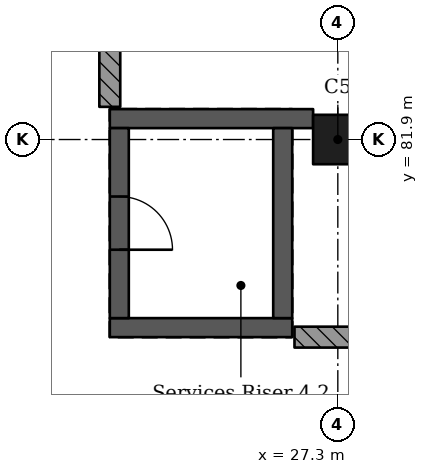
"""IFC4 building model, lengths in metres.
Left out: names, types, materials, properties, quantities, classifications, styles, units other than length and angle.
Written with IfcOpenShell. Run it as: python <this file> out.ifc"""

import sys

from ifc_helpers import new_model, si_unit, direction, frame, frame_2d, origin, origin_2d, place, context, subcontext, project, spatial, rectangle, extrude, element, fill, save


model = new_model("IFC4")
c1 = context("Model", 3, precision=1e-05, world=origin(), true_north=direction((0.0, 1.0)))
c2 = subcontext(c1, "Body", "Model", "MODEL_VIEW")
j1 = project(units=[si_unit("LENGTHUNIT", "METRE"), si_unit("PLANEANGLEUNIT", "RADIAN")], contexts=[c1])
p1 = place(None, origin())
s1 = spatial("IfcSite", under=j1, at=p1, CompositionType="ELEMENT")
p2 = place(p1, origin())
s2 = spatial("IfcBuilding", under=s1, at=p2, CompositionType="ELEMENT")
p3 = place(p2, frame((0.0, 0.0, 15.47)))
s3 = spatial("IfcBuildingStorey", under=s2, at=p3, CompositionType="ELEMENT", Elevation=15.47)
p4 = place(p3, frame((27.3, 81.9, 0.0), z_axis=(0.0, 0.0, 1.0), x_axis=(1.0, 0.0, 0.0)))
e1 = element("IfcColumn", 1, at=p4, inside=s3, PredefinedType="COLUMN", context=c2, shape_type="SweptSolid", body=[
    extrude(rectangle(XDim=0.65, YDim=0.65, at=origin_2d()), origin(), (0.0, 0.0, 1.0), 4.55),
])
p5 = place(p3, frame((26.7, 79.425, 0.0), z_axis=(0.0, 0.0, 1.0), x_axis=(-1.0, 0.0, 0.0)))
e2 = element("IfcWall", 2, at=p5, inside=s3, PredefinedType="SHEAR", context=c2, shape_type="SweptSolid", body=[
    extrude(rectangle(XDim=2.4, YDim=0.25, at=frame_2d((1.2, 0.0))), origin(), (0.0, 0.0, 1.0), 4.55),
])
p6 = place(p3, frame((26.975, 82.175, 0.0), z_axis=(0.0, 0.0, 1.0), x_axis=(-1.0, 0.0, 0.0)))
e3 = element("IfcWall", 3, at=p6, inside=s3, PredefinedType="SHEAR", context=c2, shape_type="SweptSolid", body=[
    extrude(rectangle(XDim=2.675, YDim=0.25, at=frame_2d((1.337, 0.0))), origin(), (0.0, 0.0, 1.0), 4.55),
])
p7 = place(p3, frame((24.425, 82.05, 0.0), z_axis=(0.0, 0.0, 1.0), x_axis=(0.0, -1.0, 0.0)))
e4 = element("IfcWall", 4, at=p7, inside=s3, PredefinedType="SHEAR", context=c2, shape_type="SweptSolid", body=[
    extrude(rectangle(XDim=2.5, YDim=0.25, at=frame_2d((1.25, 0.0))), origin(), (0.0, 0.0, 1.0), 4.55),
])
p8 = place(p7, frame((0.9, 0.0, 0.0)))
e5 = element("IfcOpeningElement", 5, at=p8, cuts=e4, PredefinedType="OPENING", context=c2, shape_type="SweptSolid", body=[
    extrude(rectangle(XDim=0.7, YDim=2.1, at=frame_2d((0.35, 1.05))), frame((0.0, 0.135, 0.0), z_axis=(0.0, -1.0, 0.0), x_axis=(1.0, 0.0, 0.0)), (0.0, 0.0, 1.0), 0.27),
])
p9 = place(p3, frame((26.575, 82.05, 0.0), z_axis=(0.0, 0.0, 1.0), x_axis=(0.0, -1.0, 0.0)))
e6 = element("IfcWall", 6, at=p9, inside=s3, PredefinedType="SHEAR", context=c2, shape_type="SweptSolid", body=[
    extrude(rectangle(XDim=2.5, YDim=0.25, at=frame_2d((1.25, 0.0))), origin(), (0.0, 0.0, 1.0), 4.55),
])
p10 = place(p3, frame((24.3, 82.33, 0.0), z_axis=(0.0, 0.0, 1.0), x_axis=(0.0, 1.0, 0.0)))
e7 = element("IfcWall", 7, at=p10, inside=s3, PredefinedType="SOLIDWALL", context=c2, shape_type="SweptSolid", body=[
    extrude(rectangle(XDim=6.932, YDim=0.275, at=frame_2d((3.466, 0.0))), origin(), (0.0, 0.0, 1.0), 4.3),
])
p11 = place(p3, frame((28.238, 79.3, 0.0), z_axis=(0.0, 0.0, 1.0), x_axis=(-1.0, 0.0, 0.0)))
e8 = element("IfcWall", 8, at=p11, inside=s3, PredefinedType="SOLIDWALL", context=c2, shape_type="SweptSolid", body=[
    extrude(rectangle(XDim=1.508, YDim=0.275, at=frame_2d((0.754, 0.0))), origin(), (0.0, 0.0, 1.0), 4.3),
])
p12 = place(p8, origin())
e9 = element("IfcDoor", 9, at=p12, inside=s3, OperationType="SINGLE_SWING_LEFT", PredefinedType="DOOR", context=c2, shape_type="SweptSolid", body=[
    extrude(rectangle(XDim=0.7, YDim=2.1, at=frame_2d((0.35, 1.05))), frame((0.0, 0.025, 0.0), z_axis=(0.0, -1.0, 0.0), x_axis=(1.0, 0.0, 0.0)), (0.0, 0.0, 1.0), 0.05),
])
fill(e5, e9)
save(model, sys.argv[1])
